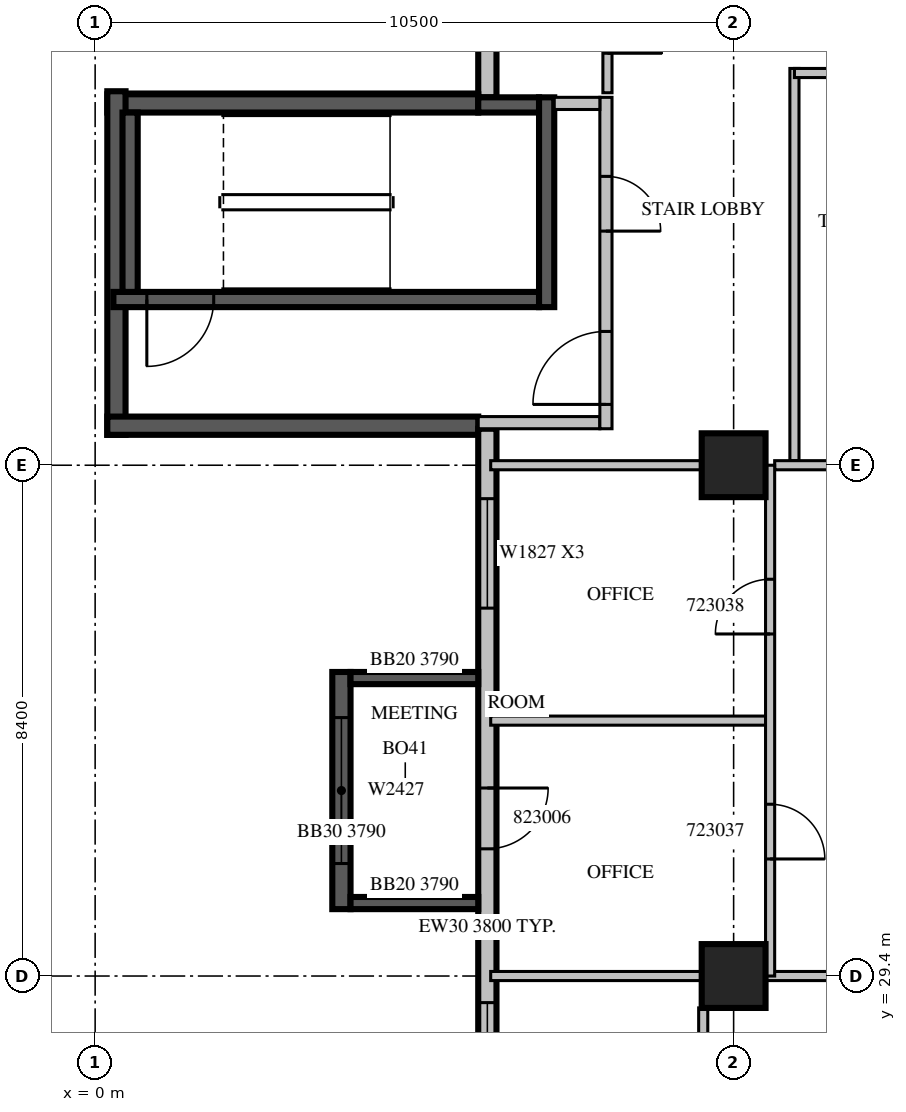
"""IFC4 building model, lengths in metres.
Left out: names, types, materials, properties, quantities, classifications, styles, units other than length and angle.
Written with IfcOpenShell. Run it as: python <this file> out.ifc"""

import sys

from ifc_helpers import new_model, si_unit, direction, frame, frame_2d, origin, origin_2d, place, context, subcontext, project, spatial, rectangle, extrude, source, transform, mapped, element, fill, save


model = new_model("IFC4")
c1 = context("Model", 3, precision=1e-05, world=origin(), true_north=direction((0.0, 1.0)))
c2 = subcontext(c1, "Body", "Model", "MODEL_VIEW")
j1 = project(units=[si_unit("LENGTHUNIT", "METRE"), si_unit("PLANEANGLEUNIT", "RADIAN")], contexts=[c1])
p1 = place(None, origin())
s1 = spatial("IfcSite", under=j1, at=p1, CompositionType="ELEMENT")
p2 = place(p1, origin())
s2 = spatial("IfcBuilding", under=s1, at=p2, CompositionType="ELEMENT")
p3 = place(p2, frame((0.0, 0.0, 107.7)))
s3 = spatial("IfcBuildingStorey", under=s2, at=p3, CompositionType="ELEMENT", Elevation=107.7)
m1 = source(origin(), c2, "Body", "SweptSolid", [
    extrude(rectangle(XDim=1.05, YDim=1.05, at=origin_2d()), origin(), (0.0, 0.0, 1.0), 4.2),
])
for number, where, z_axis, x_axis in (
    (1, (10.5, 29.4, 0.0), (0.0, 0.0, 1.0), (1.0, 0.0, 0.0)),
    (2, (10.5, 37.8, 0.0), (0.0, 0.0, 1.0), (1.0, 0.0, 0.0)),
):
    element("IfcColumn", number, at=place(p3, frame(where, z_axis=z_axis, x_axis=x_axis)), inside=s3, PredefinedType="COLUMN", context=c2, shape_type="MappedRepresentation", body=[
        mapped(m1, transform((0.0, 0.0, 0.0), scale=1.0)),
    ])
m2 = source(origin(), c2, "Body", "SweptSolid", [
    extrude(rectangle(XDim=9.91, YDim=0.3, at=frame_2d((4.955, 0.0))), origin(), (0.0, 0.0, 1.0), 3.8),
])
p4 = place(p3, frame((6.45, 53.76, 0.0), z_axis=(0.0, 0.0, 1.0), x_axis=(0.0, -1.0, 0.0)))
e3 = element("IfcWall", 3, at=p4, inside=s3, PredefinedType="STANDARD", context=c2, shape_type="MappedRepresentation", body=[
    mapped(m2, transform((0.0, 0.0, 0.0), scale=1.0)),
])
m3 = source(origin(), c2, "Body", "SweptSolid", [
    extrude(rectangle(XDim=3.6, YDim=2.7, at=frame_2d((1.8, 1.35))), frame((0.0, 0.16, 0.0), z_axis=(0.0, -1.0, 0.0), x_axis=(1.0, 0.0, 0.0)), (0.0, 0.0, 1.0), 0.32),
])
p5 = place(p4, frame((3.39, 0.0, 0.6)))
e4 = element("IfcOpeningElement", 4, at=p5, cuts=e3, PredefinedType="OPENING", context=c2, shape_type="MappedRepresentation", body=[
    mapped(m3, transform((0.0, 0.0, 0.0), scale=1.0)),
])
m4 = source(origin(), c2, "Body", "SweptSolid", [
    extrude(rectangle(XDim=2.4, YDim=2.7, at=frame_2d((1.2, 1.35))), frame((0.0, 0.16, 0.0), z_axis=(0.0, -1.0, 0.0), x_axis=(1.0, 0.0, 0.0)), (0.0, 0.0, 1.0), 0.32),
])
p6 = place(p4, frame((0.495, 0.0, 0.6)))
e5 = element("IfcOpeningElement", 5, at=p6, cuts=e3, PredefinedType="OPENING", context=c2, shape_type="MappedRepresentation", body=[
    mapped(m4, transform((0.0, 0.0, 0.0), scale=1.0)),
])
m5 = source(origin(), c2, "Body", "SweptSolid", [
    extrude(rectangle(XDim=6.1, YDim=0.3, at=frame_2d((3.05, 0.0))), origin(), (0.0, 0.0, 1.0), 3.8),
])
p7 = place(p3, frame((6.3, 43.75, 0.0), z_axis=(0.0, 0.0, 1.0), x_axis=(-1.0, 0.0, 0.0)))
e6 = element("IfcWall", 6, at=p7, inside=s3, PredefinedType="SOLIDWALL", context=c2, shape_type="MappedRepresentation", body=[
    mapped(m5, transform((0.0, 0.0, 0.0), scale=1.0)),
])
m6 = source(origin(), c2, "Body", "SweptSolid", [
    extrude(rectangle(XDim=5.65, YDim=0.3, at=frame_2d((2.825, 0.0))), origin(), (0.0, 0.0, 1.0), 3.8),
])
p8 = place(p3, frame((0.35, 43.95, 0.0), z_axis=(0.0, 0.0, 1.0), x_axis=(0.0, -1.0, 0.0)))
e7 = element("IfcWall", 7, at=p8, inside=s3, PredefinedType="SOLIDWALL", context=c2, shape_type="MappedRepresentation", body=[
    mapped(m6, transform((0.0, 0.0, 0.0), scale=1.0)),
])
p9 = place(p3, frame((0.2, 38.45, 0.0), z_axis=(0.0, 0.0, 1.0), x_axis=(1.0, 0.0, 0.0)))
e8 = element("IfcWall", 8, at=p9, inside=s3, PredefinedType="SOLIDWALL", context=c2, shape_type="MappedRepresentation", body=[
    mapped(m5, transform((0.0, 0.0, 0.0), scale=1.0)),
])
p10 = place(p3, frame((6.45, 38.4, 0.0), z_axis=(0.0, 0.0, 1.0), x_axis=(0.0, -1.0, 0.0)))
e9 = element("IfcWall", 9, at=p10, inside=s3, PredefinedType="STANDARD", context=c2, shape_type="SweptSolid", body=[
    extrude(rectangle(XDim=16.4, YDim=0.3, at=frame_2d((8.2, 0.0))), origin(), (0.0, 0.0, 1.0), 3.8),
])
m7 = source(origin(), c2, "Body", "SweptSolid", [
    extrude(rectangle(XDim=1.8, YDim=2.7, at=frame_2d((0.9, 1.35))), frame((0.0, 0.16, 0.0), z_axis=(0.0, -1.0, 0.0), x_axis=(1.0, 0.0, 0.0)), (0.0, 0.0, 1.0), 0.32),
])
p11 = place(p10, frame((1.15, 0.0, 0.6)))
e10 = element("IfcOpeningElement", 10, at=p11, cuts=e9, PredefinedType="OPENING", context=c2, shape_type="MappedRepresentation", body=[
    mapped(m7, transform((0.0, 0.0, 0.0), scale=1.0)),
])
p12 = place(p10, frame((9.438, 0.0, 0.6)))
e11 = element("IfcOpeningElement", 11, at=p12, cuts=e9, PredefinedType="OPENING", context=c2, shape_type="MappedRepresentation", body=[
    mapped(m7, transform((0.0, 0.0, 0.0), scale=1.0)),
])
p13 = place(p10, frame((13.537, 0.0, 0.6)))
e12 = element("IfcOpeningElement", 12, at=p13, cuts=e9, PredefinedType="OPENING", context=c2, shape_type="MappedRepresentation", body=[
    mapped(m7, transform((0.0, 0.0, 0.0), scale=1.0)),
])
m8 = source(origin(), c2, "Body", "SweptSolid", [
    extrude(rectangle(XDim=1.0, YDim=2.1, at=frame_2d((0.5, 1.05))), frame((0.0, 0.16, 0.0), z_axis=(0.0, -1.0, 0.0), x_axis=(1.0, 0.0, 0.0)), (0.0, 0.0, 1.0), 0.32),
])
p14 = place(p10, frame((5.908, 0.0, 0.0)))
e13 = element("IfcOpeningElement", 13, at=p14, cuts=e9, PredefinedType="OPENING", context=c2, shape_type="MappedRepresentation", body=[
    mapped(m8, transform((0.0, 0.0, 0.0), scale=1.0)),
])
p15 = place(p3, frame((4.05, 34.4, 0.0), z_axis=(0.0, 0.0, 1.0), x_axis=(0.0, -1.0, 0.0)))
e14 = element("IfcWall", 14, at=p15, inside=s3, PredefinedType="SOLIDWALL", context=c2, shape_type="SweptSolid", body=[
    extrude(rectangle(XDim=3.9, YDim=0.3, at=frame_2d((1.95, 0.0))), origin(), (0.0, 0.0, 1.0), 3.79),
])
p16 = place(p15, frame((0.75, 0.0, 0.6)))
e15 = element("IfcOpeningElement", 15, at=p16, cuts=e14, PredefinedType="OPENING", context=c2, shape_type="MappedRepresentation", body=[
    mapped(m4, transform((0.0, 0.0, 0.0), scale=1.0)),
])
p17 = place(p3, frame((6.3, 34.3, 0.0), z_axis=(0.0, 0.0, 1.0), x_axis=(-1.0, 0.0, 0.0)))
e16 = element("IfcWall", 16, at=p17, inside=s3, PredefinedType="SOLIDWALL", context=c2, shape_type="SweptSolid", body=[
    extrude(rectangle(XDim=2.1, YDim=0.2, at=frame_2d((1.05, 0.0))), origin(), (0.0, 0.0, 1.0), 3.79),
])
m9 = source(origin(), c2, "Body", "SweptSolid", [
    extrude(rectangle(XDim=2.1, YDim=0.2, at=frame_2d((1.05, 0.0))), origin(), (0.0, 0.0, 1.0), 3.79),
])
p18 = place(p3, frame((6.3, 30.6, 0.0), z_axis=(0.0, 0.0, 1.0), x_axis=(-1.0, 0.0, 0.0)))
e17 = element("IfcWall", 17, at=p18, inside=s3, PredefinedType="SOLIDWALL", context=c2, shape_type="MappedRepresentation", body=[
    mapped(m9, transform((0.0, 0.0, 0.0), scale=1.0)),
])
m10 = source(origin(), c2, "Body", "SweptSolid", [
    extrude(rectangle(XDim=7.0, YDim=0.25, at=frame_2d((3.5, 0.0))), origin(), (0.0, 0.0, 1.0), 3.8),
])
p19 = place(p3, frame((0.3, 40.525, 0.0), z_axis=(0.0, 0.0, 1.0), x_axis=(1.0, 0.0, 0.0)))
e18 = element("IfcWall", 18, at=p19, inside=s3, PredefinedType="SOLIDWALL", context=c2, shape_type="MappedRepresentation", body=[
    mapped(m10, transform((0.0, 0.0, 0.0), scale=1.0)),
])
m11 = source(origin(), c2, "Body", "SweptSolid", [
    extrude(rectangle(XDim=1.1, YDim=2.1, at=frame_2d((0.55, 1.05))), frame((0.0, 0.135, 0.0), z_axis=(0.0, -1.0, 0.0), x_axis=(1.0, 0.0, 0.0)), (0.0, 0.0, 1.0), 0.27),
])
p20 = place(p19, frame((0.55, 0.0, 0.0)))
e19 = element("IfcOpeningElement", 19, at=p20, cuts=e18, PredefinedType="OPENING", context=c2, shape_type="MappedRepresentation", body=[
    mapped(m11, transform((0.0, 0.0, 0.0), scale=1.0)),
])
m12 = source(origin(), c2, "Body", "SweptSolid", [
    extrude(rectangle(XDim=1.0, YDim=0.25, at=frame_2d((0.5, 0.0))), origin(), (0.0, 0.0, 1.0), 3.8),
])
p21 = place(p3, frame((6.3, 43.725, 0.0), z_axis=(0.0, 0.0, 1.0), x_axis=(1.0, 0.0, 0.0)))
e20 = element("IfcWall", 20, at=p21, inside=s3, PredefinedType="SOLIDWALL", context=c2, shape_type="MappedRepresentation", body=[
    mapped(m12, transform((0.0, 0.0, 0.0), scale=1.0)),
])
m13 = source(origin(), c2, "Body", "SweptSolid", [
    extrude(rectangle(XDim=3.45, YDim=0.25, at=frame_2d((1.725, 0.0))), origin(), (0.0, 0.0, 1.0), 3.8),
])
p22 = place(p3, frame((7.425, 40.4, 0.0), z_axis=(0.0, 0.0, 1.0), x_axis=(0.0, 1.0, 0.0)))
e21 = element("IfcWall", 21, at=p22, inside=s3, PredefinedType="SOLIDWALL", context=c2, shape_type="MappedRepresentation", body=[
    mapped(m13, transform((0.0, 0.0, 0.0), scale=1.0)),
])
m14 = source(origin(), c2, "Body", "SweptSolid", [
    extrude(rectangle(XDim=2.95, YDim=0.25, at=frame_2d((1.475, 0.0))), origin(), (0.0, 0.0, 1.0), 3.8),
])
p23 = place(p3, frame((0.575, 40.65, 0.0), z_axis=(0.0, 0.0, 1.0), x_axis=(0.0, 1.0, 0.0)))
e22 = element("IfcWall", 22, at=p23, inside=s3, PredefinedType="SOLIDWALL", context=c2, shape_type="MappedRepresentation", body=[
    mapped(m14, transform((0.0, 0.0, 0.0), scale=1.0)),
])
m15 = source(origin(), c2, "Body", "SweptSolid", [
    extrude(rectangle(XDim=2.0, YDim=0.2, at=frame_2d((1.0, 0.0))), origin(), (0.0, 0.0, 1.0), 3.8),
])
p24 = place(p3, frame((6.3, 38.5, 0.0), z_axis=(0.0, 0.0, 1.0), x_axis=(1.0, 0.0, 0.0)))
e23 = element("IfcWall", 23, at=p24, inside=s3, PredefinedType="PARTITIONING", context=c2, shape_type="MappedRepresentation", body=[
    mapped(m15, transform((0.0, 0.0, 0.0), scale=1.0)),
])
m16 = source(origin(), c2, "Body", "SweptSolid", [
    extrude(rectangle(XDim=5.45, YDim=0.2, at=frame_2d((2.725, 0.0))), origin(), (0.0, 0.0, 1.0), 3.8),
])
p25 = place(p3, frame((8.4, 38.4, 0.0), z_axis=(0.0, 0.0, 1.0), x_axis=(0.0, 1.0, 0.0)))
e24 = element("IfcWall", 24, at=p25, inside=s3, PredefinedType="PARTITIONING", context=c2, shape_type="MappedRepresentation", body=[
    mapped(m16, transform((0.0, 0.0, 0.0), scale=1.0)),
])
m17 = source(origin(), c2, "Body", "SweptSolid", [
    extrude(rectangle(XDim=1.2, YDim=2.1, at=frame_2d((0.6, 1.05))), frame((0.0, 0.11, 0.0), z_axis=(0.0, -1.0, 0.0), x_axis=(1.0, 0.0, 0.0)), (0.0, 0.0, 1.0), 0.22),
])
p26 = place(p25, frame((0.4, 0.0, 0.0)))
e25 = element("IfcOpeningElement", 25, at=p26, cuts=e24, PredefinedType="OPENING", context=c2, shape_type="MappedRepresentation", body=[
    mapped(m17, transform((0.0, 0.0, 0.0), scale=1.0)),
])
m18 = source(origin(), c2, "Body", "SweptSolid", [
    extrude(rectangle(XDim=0.9, YDim=2.1, at=frame_2d((0.45, 1.05))), frame((0.0, 0.11, 0.0), z_axis=(0.0, -1.0, 0.0), x_axis=(1.0, 0.0, 0.0)), (0.0, 0.0, 1.0), 0.22),
])
p27 = place(p25, frame((3.25, 0.0, 0.0)))
e26 = element("IfcOpeningElement", 26, at=p27, cuts=e24, PredefinedType="OPENING", context=c2, shape_type="MappedRepresentation", body=[
    mapped(m18, transform((0.0, 0.0, 0.0), scale=1.0)),
])
m19 = source(origin(), c2, "Body", "SweptSolid", [
    extrude(rectangle(XDim=0.75, YDim=0.2, at=frame_2d((0.375, 0.0))), origin(), (0.0, 0.0, 1.0), 3.8),
])
p28 = place(p3, frame((7.55, 43.75, 0.0), z_axis=(0.0, 0.0, 1.0), x_axis=(1.0, 0.0, 0.0)))
e27 = element("IfcWall", 27, at=p28, inside=s3, PredefinedType="PARTITIONING", context=c2, shape_type="MappedRepresentation", body=[
    mapped(m19, transform((0.0, 0.0, 0.0), scale=1.0)),
])
p29 = place(p3, frame((10.0, 25.475, 0.0), z_axis=(0.0, 0.0, 1.0), x_axis=(0.0, 1.0, 0.0)))
e28 = element("IfcWall", 28, at=p29, inside=s3, PredefinedType="PARTITIONING", context=c2, shape_type="SweptSolid", body=[
    extrude(rectangle(XDim=3.401, YDim=0.15, at=frame_2d((1.7, 0.0))), origin(), (0.0, 0.0, 1.0), 3.8),
])
m20 = source(origin(), c2, "Body", "SweptSolid", [
    extrude(rectangle(XDim=3.471, YDim=0.15, at=frame_2d((1.736, 0.0))), origin(), (0.0, 0.0, 1.0), 3.8),
])
p30 = place(p3, frame((9.976, 29.4, 0.0), z_axis=(0.0, 0.0, 1.0), x_axis=(-1.0, 0.0, 0.0)))
e29 = element("IfcWall", 29, at=p30, inside=s3, PredefinedType="PARTITIONING", context=c2, shape_type="MappedRepresentation", body=[
    mapped(m20, transform((0.0, 0.0, 0.0), scale=1.0)),
])
m21 = source(origin(), c2, "Body", "SweptSolid", [
    extrude(rectangle(XDim=3.676, YDim=0.15, at=frame_2d((1.838, 0.0))), origin(), (0.0, 0.0, 1.0), 3.8),
])
p31 = place(p3, frame((14.7, 29.4, 0.0), z_axis=(0.0, 0.0, 1.0), x_axis=(-1.0, 0.0, 0.0)))
e30 = element("IfcWall", 30, at=p31, inside=s3, PredefinedType="PARTITIONING", context=c2, shape_type="MappedRepresentation", body=[
    mapped(m21, transform((0.0, 0.0, 0.0), scale=1.0)),
])
m22 = source(origin(), c2, "Body", "SweptSolid", [
    extrude(rectangle(XDim=6.45, YDim=0.15, at=frame_2d((3.225, 0.0))), origin(), (0.0, 0.0, 1.0), 3.8),
])
p32 = place(p3, frame((11.5, 44.325, 0.0), z_axis=(0.0, 0.0, 1.0), x_axis=(0.0, -1.0, 0.0)))
e31 = element("IfcWall", 31, at=p32, inside=s3, PredefinedType="PARTITIONING", context=c2, shape_type="MappedRepresentation", body=[
    mapped(m22, transform((0.0, 0.0, 0.0), scale=1.0)),
])
m23 = source(origin(), c2, "Body", "SweptSolid", [
    extrude(rectangle(XDim=3.275, YDim=0.15, at=frame_2d((1.637, 0.0))), origin(), (0.0, 0.0, 1.0), 3.8),
])
p33 = place(p3, frame((14.775, 44.25, 0.0), z_axis=(0.0, 0.0, 1.0), x_axis=(-1.0, 0.0, 0.0)))
e32 = element("IfcWall", 32, at=p33, inside=s3, PredefinedType="PARTITIONING", context=c2, shape_type="MappedRepresentation", body=[
    mapped(m23, transform((0.0, 0.0, 0.0), scale=1.0)),
])
m24 = source(origin(), c2, "Body", "SweptSolid", [
    extrude(rectangle(XDim=2.2, YDim=0.15, at=frame_2d((1.1, 0.0))), origin(), (0.0, 0.0, 1.0), 3.8),
])
p34 = place(p3, frame((8.425, 43.925, 0.0), z_axis=(0.0, 0.0, 1.0), x_axis=(0.0, 1.0, 0.0)))
e33 = element("IfcWall", 33, at=p34, inside=s3, PredefinedType="PARTITIONING", context=c2, shape_type="MappedRepresentation", body=[
    mapped(m24, transform((0.0, 0.0, 0.0), scale=1.0)),
])
m25 = source(origin(), c2, "Body", "SweptSolid", [
    extrude(rectangle(XDim=0.9, YDim=2.1, at=frame_2d((0.45, 1.05))), frame((0.0, 0.085, 0.0), z_axis=(0.0, -1.0, 0.0), x_axis=(1.0, 0.0, 0.0)), (0.0, 0.0, 1.0), 0.17),
])
p35 = place(p34, frame((0.65, 0.0, 0.0)))
e34 = element("IfcOpeningElement", 34, at=p35, cuts=e33, PredefinedType="OPENING", context=c2, shape_type="MappedRepresentation", body=[
    mapped(m25, transform((0.0, 0.0, 0.0), scale=1.0)),
])
m26 = source(origin(), c2, "Body", "SweptSolid", [
    extrude(rectangle(XDim=4.52, YDim=0.15, at=frame_2d((2.26, 0.0))), origin(), (0.0, 0.0, 1.0), 3.8),
])
p36 = place(p3, frame((11.025, 33.6, 0.0), z_axis=(0.0, 0.0, 1.0), x_axis=(-1.0, 0.0, 0.0)))
e35 = element("IfcWall", 35, at=p36, inside=s3, PredefinedType="PARTITIONING", context=c2, shape_type="MappedRepresentation", body=[
    mapped(m26, transform((0.0, 0.0, 0.0), scale=1.0)),
])
p37 = place(p3, frame((9.976, 37.8, 0.0), z_axis=(0.0, 0.0, 1.0), x_axis=(-1.0, 0.0, 0.0)))
e36 = element("IfcWall", 36, at=p37, inside=s3, PredefinedType="PARTITIONING", context=c2, shape_type="MappedRepresentation", body=[
    mapped(m20, transform((0.0, 0.0, 0.0), scale=1.0)),
])
m27 = source(origin(), c2, "Body", "SweptSolid", [
    extrude(rectangle(XDim=3.525, YDim=0.15, at=frame_2d((1.762, 0.0))), origin(), (0.0, 0.0, 1.0), 3.8),
])
p38 = place(p3, frame((14.7, 37.8, 0.0), z_axis=(0.0, 0.0, 1.0), x_axis=(-1.0, 0.0, 0.0)))
e37 = element("IfcWall", 37, at=p38, inside=s3, PredefinedType="PARTITIONING", context=c2, shape_type="MappedRepresentation", body=[
    mapped(m27, transform((0.0, 0.0, 0.0), scale=1.0)),
])
m28 = source(origin(), c2, "Body", "SweptSolid", [
    extrude(rectangle(XDim=8.4, YDim=0.15, at=frame_2d((4.2, 0.0))), origin(), (0.0, 0.0, 1.0), 3.8),
])
p39 = place(p3, frame((11.1, 29.4, 0.0), z_axis=(0.0, 0.0, 1.0), x_axis=(0.0, 1.0, 0.0)))
e38 = element("IfcWall", 38, at=p39, inside=s3, PredefinedType="PARTITIONING", context=c2, shape_type="MappedRepresentation", body=[
    mapped(m28, transform((0.0, 0.0, 0.0), scale=1.0)),
])
p40 = place(p39, frame((1.925, 0.0, 0.0)))
e39 = element("IfcOpeningElement", 39, at=p40, cuts=e38, PredefinedType="OPENING", context=c2, shape_type="MappedRepresentation", body=[
    mapped(m25, transform((0.0, 0.0, 0.0), scale=1.0)),
])
p41 = place(p39, frame((5.625, 0.0, 0.0)))
e40 = element("IfcOpeningElement", 40, at=p41, cuts=e38, PredefinedType="OPENING", context=c2, shape_type="MappedRepresentation", body=[
    mapped(m25, transform((0.0, 0.0, 0.0), scale=1.0)),
])
m29 = source(origin(), c2, "Body", "SweptSolid", [
    extrude(rectangle(XDim=1.8, YDim=2.7, at=frame_2d((0.9, 1.35))), frame((0.0, 0.03, 0.0), z_axis=(0.0, -1.0, 0.0), x_axis=(1.0, 0.0, 0.0)), (0.0, 0.0, 1.0), 0.06),
])
p42 = place(p11, origin())
e41 = element("IfcWindow", 41, at=p42, inside=s3, PartitioningType="SINGLE_PANEL", PredefinedType="WINDOW", context=c2, shape_type="MappedRepresentation", body=[
    mapped(m29, transform((0.0, 0.0, 0.0), scale=1.0)),
])
fill(e10, e41)
p43 = place(p12, origin())
e42 = element("IfcWindow", 42, at=p43, inside=s3, PartitioningType="SINGLE_PANEL", PredefinedType="WINDOW", context=c2, shape_type="MappedRepresentation", body=[
    mapped(m29, transform((0.0, 0.0, 0.0), scale=1.0)),
])
fill(e11, e42)
m30 = source(origin(), c2, "Body", "SweptSolid", [
    extrude(rectangle(XDim=2.4, YDim=2.7, at=frame_2d((1.2, 1.35))), frame((0.0, 0.03, 0.0), z_axis=(0.0, -1.0, 0.0), x_axis=(1.0, 0.0, 0.0)), (0.0, 0.0, 1.0), 0.06),
])
p44 = place(p16, origin())
e43 = element("IfcWindow", 43, at=p44, inside=s3, PartitioningType="SINGLE_PANEL", PredefinedType="WINDOW", context=c2, shape_type="MappedRepresentation", body=[
    mapped(m30, transform((0.0, 0.0, 0.0), scale=1.0)),
])
fill(e15, e43)
m31 = source(origin(), c2, "Body", "SweptSolid", [
    extrude(rectangle(XDim=1.1, YDim=2.1, at=frame_2d((0.55, 1.05))), frame((0.0, 0.025, 0.0), z_axis=(0.0, -1.0, 0.0), x_axis=(1.0, 0.0, 0.0)), (0.0, 0.0, 1.0), 0.05),
])
p45 = place(p20, origin())
e44 = element("IfcDoor", 44, at=p45, inside=s3, OperationType="SINGLE_SWING_RIGHT", PredefinedType="DOOR", context=c2, shape_type="MappedRepresentation", body=[
    mapped(m31, transform((0.0, 0.0, 0.0), scale=1.0)),
])
fill(e19, e44)
m32 = source(origin(), c2, "Body", "SweptSolid", [
    extrude(rectangle(XDim=1.2, YDim=2.1, at=frame_2d((0.6, 1.05))), frame((0.0, 0.025, 0.0), z_axis=(0.0, -1.0, 0.0), x_axis=(1.0, 0.0, 0.0)), (0.0, 0.0, 1.0), 0.05),
])
p46 = place(p26, origin())
e45 = element("IfcDoor", 45, at=p46, inside=s3, OperationType="SINGLE_SWING_LEFT", PredefinedType="DOOR", context=c2, shape_type="MappedRepresentation", body=[
    mapped(m32, transform((0.0, 0.0, 0.0), scale=1.0)),
])
fill(e25, e45)
m33 = source(origin(), c2, "Body", "SweptSolid", [
    extrude(rectangle(XDim=0.9, YDim=2.1, at=frame_2d((0.45, 1.05))), frame((0.0, 0.025, 0.0), z_axis=(0.0, -1.0, 0.0), x_axis=(1.0, 0.0, 0.0)), (0.0, 0.0, 1.0), 0.05),
])
p47 = place(p27, origin())
e46 = element("IfcDoor", 46, at=p47, inside=s3, OperationType="SINGLE_SWING_RIGHT", PredefinedType="DOOR", context=c2, shape_type="MappedRepresentation", body=[
    mapped(m33, transform((0.0, 0.0, 0.0), scale=1.0)),
])
fill(e26, e46)
p48 = place(p35, origin())
e47 = element("IfcDoor", 47, at=p48, inside=s3, OperationType="SINGLE_SWING_RIGHT", PredefinedType="DOOR", context=c2, shape_type="MappedRepresentation", body=[
    mapped(m33, transform((0.0, 0.0, 0.0), scale=1.0)),
])
fill(e34, e47)
p49 = place(p40, origin())
e48 = element("IfcDoor", 48, at=p49, inside=s3, OperationType="SINGLE_SWING_RIGHT", PredefinedType="DOOR", context=c2, shape_type="MappedRepresentation", body=[
    mapped(m33, transform((0.0, 0.0, 0.0), scale=1.0)),
])
fill(e39, e48)
p50 = place(p41, origin())
e49 = element("IfcDoor", 49, at=p50, inside=s3, OperationType="SINGLE_SWING_LEFT", PredefinedType="DOOR", context=c2, shape_type="MappedRepresentation", body=[
    mapped(m33, transform((0.0, 0.0, 0.0), scale=1.0)),
])
fill(e40, e49)
m34 = source(origin(), c2, "Body", "SweptSolid", [
    extrude(rectangle(XDim=1.0, YDim=2.1, at=frame_2d((0.5, 1.05))), frame((0.0, 0.025, 0.0), z_axis=(0.0, -1.0, 0.0), x_axis=(1.0, 0.0, 0.0)), (0.0, 0.0, 1.0), 0.05),
])
p51 = place(p14, origin())
e50 = element("IfcDoor", 50, at=p51, inside=s3, OperationType="SINGLE_SWING_LEFT", PredefinedType="DOOR", context=c2, shape_type="MappedRepresentation", body=[
    mapped(m34, transform((0.0, 0.0, 0.0), scale=1.0)),
])
fill(e13, e50)
save(model, sys.argv[1])
